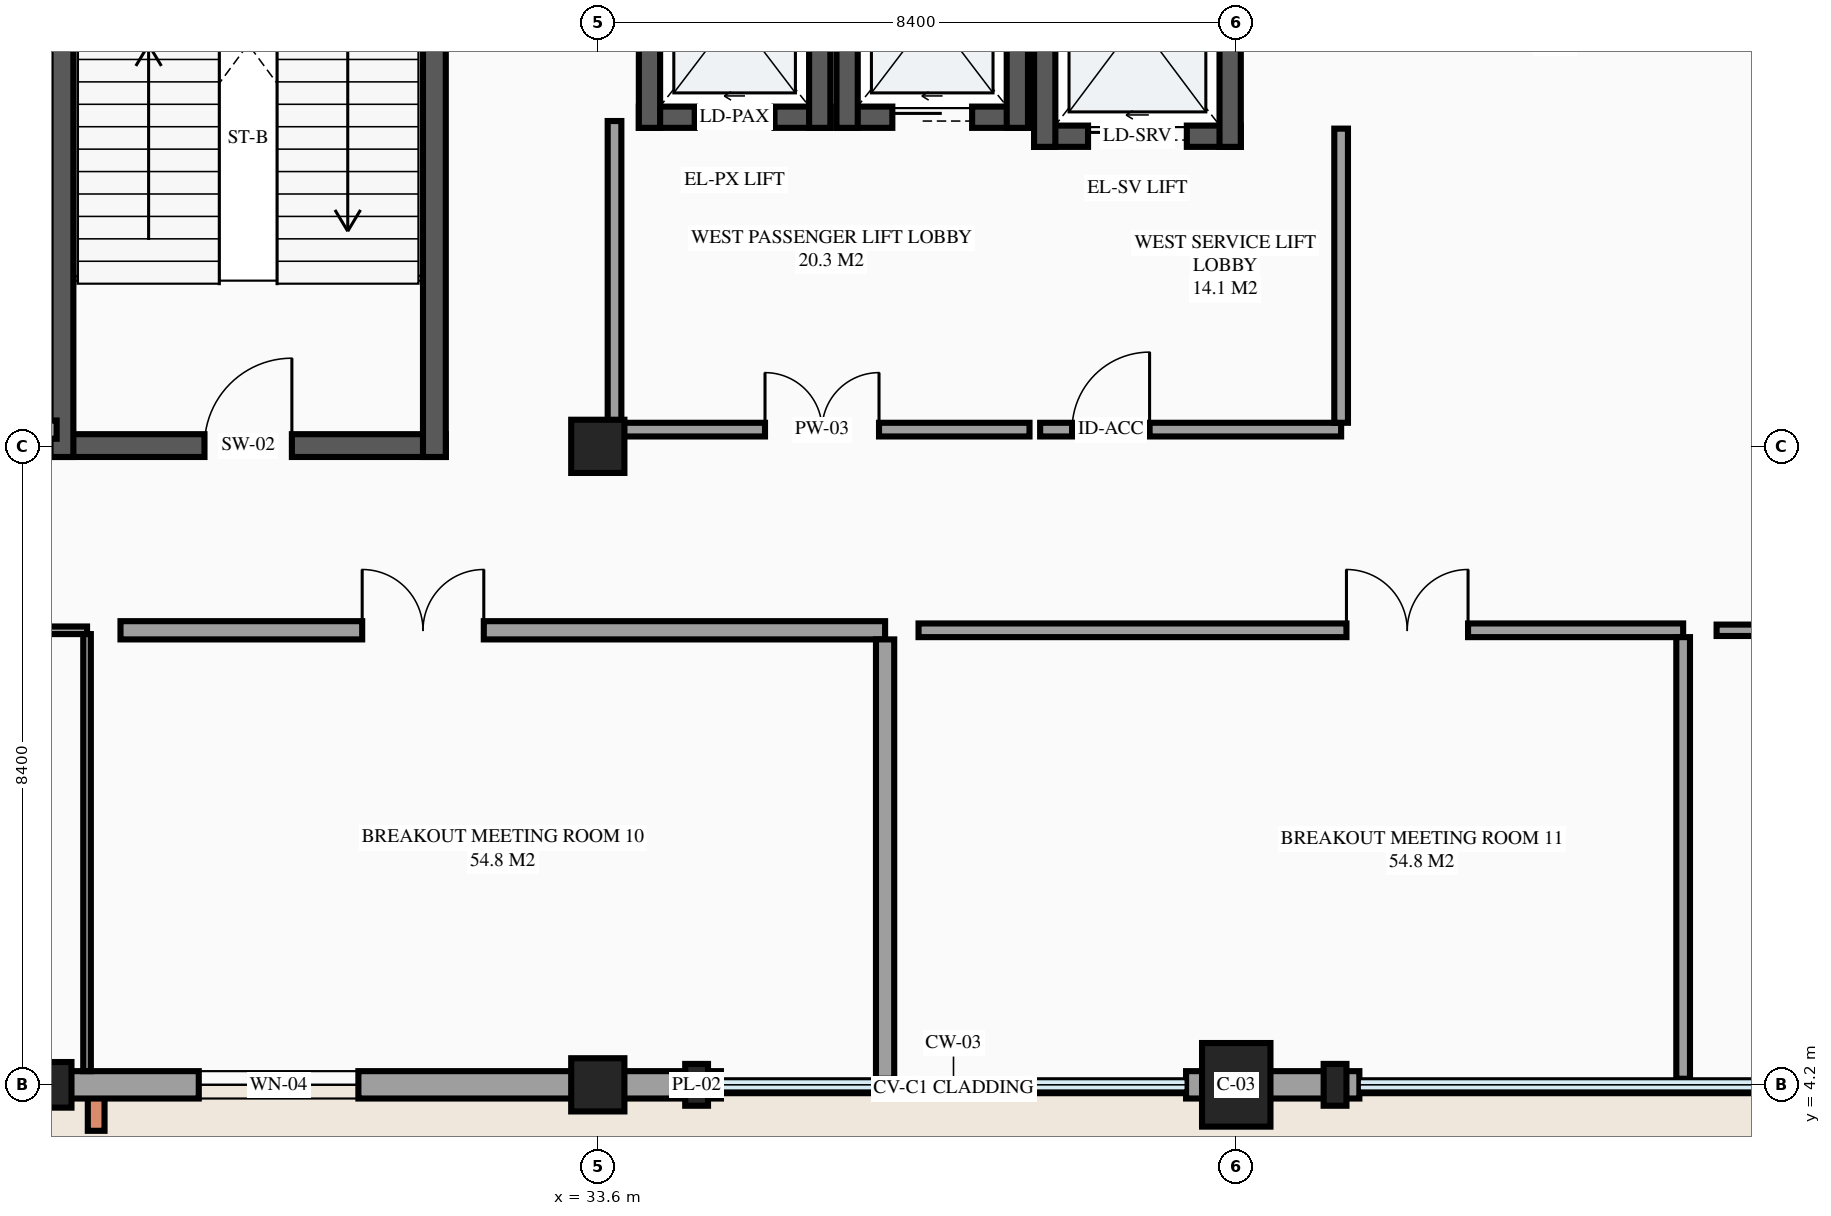
"""IFC4 building model, lengths in metres.
Left out: names, types, materials, properties, quantities, classifications, styles, units other than length and angle.
Written with IfcOpenShell. Run it as: python <this file> out.ifc"""

import sys

from ifc_helpers import new_model, si_unit, direction, frame, frame_2d, origin, origin_2d, place, context, subcontext, project, spatial, rectangle, extrude, element, fill, save


model = new_model("IFC4")
c1 = context("Model", 3, precision=1e-05, world=origin(), true_north=direction((0.0, 1.0)))
c2 = subcontext(c1, "Body", "Model", "MODEL_VIEW")
j1 = project(units=[si_unit("LENGTHUNIT", "METRE"), si_unit("PLANEANGLEUNIT", "RADIAN")], contexts=[c1])
p1 = place(None, origin())
s1 = spatial("IfcSite", under=j1, at=p1, CompositionType="ELEMENT")
p2 = place(p1, origin())
s2 = spatial("IfcBuilding", under=s1, at=p2, CompositionType="ELEMENT")
p3 = place(p2, frame((0.0, 0.0, 9.9)))
s3 = spatial("IfcBuildingStorey", under=s2, at=p3, CompositionType="ELEMENT", Elevation=9.9)
for number, where, z_axis, x_axis in (
    (1, (33.6, 4.2, 0.0), (0.0, 0.0, 1.0), (1.0, 0.0, 0.0)),
    (2, (33.6, 12.6, 0.0), (0.0, 0.0, 1.0), (1.0, 0.0, 0.0)),
):
    element("IfcColumn", number, at=place(p3, frame(where, z_axis=z_axis, x_axis=x_axis)), inside=s3, PredefinedType="COLUMN", context=c2, shape_type="SweptSolid", body=[
        extrude(rectangle(XDim=0.7, YDim=0.7, at=origin_2d()), origin(), (0.0, 0.0, 1.0), 4.2),
    ])
p4 = place(p3, frame((42.0, 4.2, 0.0), z_axis=(0.0, 0.0, 1.0), x_axis=(1.0, 0.0, 0.0)))
e3 = element("IfcColumn", 3, at=p4, inside=s3, PredefinedType="COLUMN", context=c2, shape_type="SweptSolid", body=[
    extrude(rectangle(XDim=0.9, YDim=1.1, at=origin_2d()), origin(), (0.0, 0.0, 1.0), 4.2),
])
p5 = place(p3, frame((26.5, 4.2, 0.0), z_axis=(0.0, 0.0, 1.0), x_axis=(1.0, 0.0, 0.0)))
e4 = element("IfcColumn", 4, at=p5, inside=s3, PredefinedType="PILASTER", context=c2, shape_type="SweptSolid", body=[
    extrude(rectangle(XDim=0.35, YDim=0.6, at=origin_2d()), origin(), (0.0, 0.0, 1.0), 4.2),
])
for number, where, z_axis, x_axis in (
    (5, (34.9, 4.2, 0.0), (0.0, 0.0, 1.0), (1.0, 0.0, 0.0)),
    (6, (43.3, 4.2, 0.0), (0.0, 0.0, 1.0), (1.0, 0.0, 0.0)),
):
    element("IfcColumn", number, at=place(p3, frame(where, z_axis=z_axis, x_axis=x_axis)), inside=s3, PredefinedType="PILASTER", context=c2, shape_type="SweptSolid", body=[
        extrude(rectangle(XDim=0.3, YDim=0.55, at=origin_2d()), origin(), (0.0, 0.0, 1.0), 4.2),
    ])
p6 = place(p3, frame((25.2, 4.2, 0.0), z_axis=(0.0, 0.0, 1.0), x_axis=(1.0, 0.0, 0.0)))
e7 = element("IfcWall", 7, at=p6, inside=s3, PredefinedType="STANDARD", context=c2, shape_type="SweptSolid", body=[
    extrude(rectangle(XDim=8.4, YDim=0.36, at=frame_2d((4.2, 0.0))), origin(), (0.0, 0.0, 1.0), 3.427),
])
p7 = place(p6, frame((3.15, 0.0, 0.75)))
e8 = element("IfcOpeningElement", 8, at=p7, cuts=e7, PredefinedType="OPENING", context=c2, shape_type="SweptSolid", body=[
    extrude(rectangle(XDim=2.1, YDim=1.5, at=frame_2d((1.05, 0.75))), frame((0.0, 0.19, 0.0), z_axis=(0.0, -1.0, 0.0), x_axis=(1.0, 0.0, 0.0)), (0.0, 0.0, 1.0), 0.38),
])
p8 = place(p3, frame((33.6, 4.2, 0.0), z_axis=(0.0, 0.0, 1.0), x_axis=(1.0, 0.0, 0.0)))
e9 = element("IfcWall", 9, at=p8, inside=s3, PredefinedType="STANDARD", context=c2, shape_type="SweptSolid", body=[
    extrude(rectangle(XDim=1.62, YDim=0.36, at=frame_2d((0.81, 0.0))), origin(), (0.0, 0.0, 1.0), 3.36),
])
p9 = place(p3, frame((41.34, 4.2, 0.0), z_axis=(0.0, 0.0, 1.0), x_axis=(1.0, 0.0, 0.0)))
e10 = element("IfcWall", 10, at=p9, inside=s3, PredefinedType="STANDARD", context=c2, shape_type="SweptSolid", body=[
    extrude(rectangle(XDim=0.66, YDim=0.36, at=frame_2d((0.33, 0.0))), origin(), (0.0, 0.0, 1.0), 4.2),
])
p10 = place(p3, frame((42.0, 4.2, 0.0), z_axis=(0.0, 0.0, 1.0), x_axis=(1.0, 0.0, 0.0)))
e11 = element("IfcWall", 11, at=p10, inside=s3, PredefinedType="STANDARD", context=c2, shape_type="SweptSolid", body=[
    extrude(rectangle(XDim=1.62, YDim=0.36, at=frame_2d((0.81, 0.0))), origin(), (0.0, 0.0, 1.0), 3.46),
])
p11 = place(p3, frame((34.14, 16.93, 0.0), z_axis=(0.0, 0.0, 1.0), x_axis=(1.0, 0.0, 0.0)))
e12 = element("IfcWall", 12, at=p11, inside=s3, PredefinedType="SHEAR", context=c2, shape_type="SweptSolid", body=[
    extrude(rectangle(XDim=2.52, YDim=0.28, at=frame_2d((1.26, 0.0))), origin(), (0.0, 0.0, 1.0), 4.2),
])
p12 = place(p11, frame((0.735, 0.0, 0.0)))
e13 = element("IfcOpeningElement", 13, at=p12, cuts=e12, PredefinedType="OPENING", context=c2, shape_type="SweptSolid", body=[
    extrude(rectangle(XDim=1.05, YDim=2.2, at=frame_2d((0.525, 1.1))), frame((0.0, 0.15, 0.0), z_axis=(0.0, -1.0, 0.0), x_axis=(1.0, 0.0, 0.0)), (0.0, 0.0, 1.0), 0.3),
])
for number, where, z_axis, x_axis in (
    (14, (36.52, 16.79, 0.0), (0.0, 0.0, 1.0), (0.0, 1.0, 0.0)),
    (15, (34.28, 19.81, 0.0), (0.0, 0.0, 1.0), (0.0, -1.0, 0.0)),
):
    element("IfcWall", number, at=place(p3, frame(where, z_axis=z_axis, x_axis=x_axis)), inside=s3, PredefinedType="SHEAR", context=c2, shape_type="SweptSolid", body=[
        extrude(rectangle(XDim=3.02, YDim=0.28, at=frame_2d((1.51, 0.0))), origin(), (0.0, 0.0, 1.0), 4.2),
    ])
p13 = place(p3, frame((36.74, 16.93, 0.0), z_axis=(0.0, 0.0, 1.0), x_axis=(1.0, 0.0, 0.0)))
e16 = element("IfcWall", 16, at=p13, inside=s3, PredefinedType="SHEAR", context=c2, shape_type="SweptSolid", body=[
    extrude(rectangle(XDim=2.52, YDim=0.28, at=frame_2d((1.26, 0.0))), origin(), (0.0, 0.0, 1.0), 4.2),
])
p14 = place(p13, frame((0.735, 0.0, 0.0)))
e17 = element("IfcOpeningElement", 17, at=p14, cuts=e16, PredefinedType="OPENING", context=c2, shape_type="SweptSolid", body=[
    extrude(rectangle(XDim=1.05, YDim=2.2, at=frame_2d((0.525, 1.1))), frame((0.0, 0.15, 0.0), z_axis=(0.0, -1.0, 0.0), x_axis=(1.0, 0.0, 0.0)), (0.0, 0.0, 1.0), 0.3),
])
for number, where, z_axis, x_axis in (
    (18, (39.12, 16.79, 0.0), (0.0, 0.0, 1.0), (0.0, 1.0, 0.0)),
    (19, (36.88, 19.81, 0.0), (0.0, 0.0, 1.0), (0.0, -1.0, 0.0)),
):
    element("IfcWall", number, at=place(p3, frame(where, z_axis=z_axis, x_axis=x_axis)), inside=s3, PredefinedType="SHEAR", context=c2, shape_type="SweptSolid", body=[
        extrude(rectangle(XDim=3.02, YDim=0.28, at=frame_2d((1.51, 0.0))), origin(), (0.0, 0.0, 1.0), 4.2),
    ])
p15 = place(p3, frame((39.34, 16.68, 0.0), z_axis=(0.0, 0.0, 1.0), x_axis=(1.0, 0.0, 0.0)))
e20 = element("IfcWall", 20, at=p15, inside=s3, PredefinedType="SHEAR", context=c2, shape_type="SweptSolid", body=[
    extrude(rectangle(XDim=2.72, YDim=0.28, at=frame_2d((1.36, 0.0))), origin(), (0.0, 0.0, 1.0), 4.2),
])
p16 = place(p15, frame((0.71, 0.0, 0.0)))
e21 = element("IfcOpeningElement", 21, at=p16, cuts=e20, PredefinedType="OPENING", context=c2, shape_type="SweptSolid", body=[
    extrude(rectangle(XDim=1.3, YDim=2.25, at=frame_2d((0.65, 1.125))), frame((0.0, 0.15, 0.0), z_axis=(0.0, -1.0, 0.0), x_axis=(1.0, 0.0, 0.0)), (0.0, 0.0, 1.0), 0.3),
])
for number, where, z_axis, x_axis in (
    (22, (41.92, 16.54, 0.0), (0.0, 0.0, 1.0), (0.0, 1.0, 0.0)),
    (23, (39.48, 19.86, 0.0), (0.0, 0.0, 1.0), (0.0, -1.0, 0.0)),
):
    element("IfcWall", number, at=place(p3, frame(where, z_axis=z_axis, x_axis=x_axis)), inside=s3, PredefinedType="SHEAR", context=c2, shape_type="SweptSolid", body=[
        extrude(rectangle(XDim=3.32, YDim=0.28, at=frame_2d((1.66, 0.0))), origin(), (0.0, 0.0, 1.0), 4.2),
    ])
p17 = place(p3, frame((26.4, 12.61, 0.0), z_axis=(0.0, 0.0, 1.0), x_axis=(1.0, 0.0, 0.0)))
e24 = element("IfcWall", 24, at=p17, inside=s3, PredefinedType="SHEAR", context=c2, shape_type="SweptSolid", body=[
    extrude(rectangle(XDim=5.2, YDim=0.3, at=frame_2d((2.6, 0.0))), origin(), (0.0, 0.0, 1.0), 4.2),
])
p18 = place(p17, frame((2.025, 0.0, 0.0)))
e25 = element("IfcOpeningElement", 25, at=p18, cuts=e24, PredefinedType="OPENING", context=c2, shape_type="SweptSolid", body=[
    extrude(rectangle(XDim=1.15, YDim=2.15, at=frame_2d((0.575, 1.075))), frame((0.0, 0.16, 0.0), z_axis=(0.0, -1.0, 0.0), x_axis=(1.0, 0.0, 0.0)), (0.0, 0.0, 1.0), 0.32),
])
for number, where, z_axis, x_axis in (
    (26, (31.45, 12.46, 0.0), (0.0, 0.0, 1.0), (0.0, 1.0, 0.0)),
    (27, (26.55, 21.3, 0.0), (0.0, 0.0, 1.0), (0.0, -1.0, 0.0)),
):
    element("IfcWall", number, at=place(p3, frame(where, z_axis=z_axis, x_axis=x_axis)), inside=s3, PredefinedType="SHEAR", context=c2, shape_type="SweptSolid", body=[
        extrude(rectangle(XDim=8.84, YDim=0.3, at=frame_2d((4.42, 0.0))), origin(), (0.0, 0.0, 1.0), 4.2),
    ])
p19 = place(p3, frame((33.82, 12.82, 0.0), z_axis=(0.0, 0.0, 1.0), x_axis=(1.0, 0.0, 0.0)))
e28 = element("IfcWall", 28, at=p19, inside=s3, PredefinedType="PARTITIONING", context=c2, shape_type="SweptSolid", body=[
    extrude(rectangle(XDim=5.46, YDim=0.18, at=frame_2d((2.73, 0.0))), origin(), (0.0, 0.0, 1.0), 3.955),
])
p20 = place(p19, frame((1.98, 0.0, 0.0)))
e29 = element("IfcOpeningElement", 29, at=p20, cuts=e28, PredefinedType="OPENING", context=c2, shape_type="SweptSolid", body=[
    extrude(rectangle(XDim=1.5, YDim=2.15, at=frame_2d((0.75, 1.075))), frame((0.0, 0.1, 0.0), z_axis=(0.0, -1.0, 0.0), x_axis=(1.0, 0.0, 0.0)), (0.0, 0.0, 1.0), 0.2),
])
p21 = place(p3, frame((33.82, 12.91, 0.0), z_axis=(0.0, 0.0, 1.0), x_axis=(0.0, 1.0, 0.0)))
e30 = element("IfcWall", 30, at=p21, inside=s3, PredefinedType="PARTITIONING", context=c2, shape_type="SweptSolid", body=[
    extrude(rectangle(XDim=3.97, YDim=0.18, at=frame_2d((1.985, 0.0))), origin(), (0.0, 0.0, 1.0), 3.11),
])
p22 = place(p3, frame((39.42, 12.82, 0.0), z_axis=(0.0, 0.0, 1.0), x_axis=(1.0, 0.0, 0.0)))
e31 = element("IfcWall", 31, at=p22, inside=s3, PredefinedType="PARTITIONING", context=c2, shape_type="SweptSolid", body=[
    extrude(rectangle(XDim=3.96, YDim=0.18, at=frame_2d((1.98, 0.0))), origin(), (0.0, 0.0, 1.0), 3.955),
])
p23 = place(p22, frame((0.42, 0.0, 0.0)))
e32 = element("IfcOpeningElement", 32, at=p23, cuts=e31, PredefinedType="OPENING", context=c2, shape_type="SweptSolid", body=[
    extrude(rectangle(XDim=1.02, YDim=2.15, at=frame_2d((0.51, 1.075))), frame((0.0, 0.1, 0.0), z_axis=(0.0, -1.0, 0.0), x_axis=(1.0, 0.0, 0.0)), (0.0, 0.0, 1.0), 0.2),
])
p24 = place(p3, frame((43.38, 12.91, 0.0), z_axis=(0.0, 0.0, 1.0), x_axis=(0.0, 1.0, 0.0)))
e33 = element("IfcWall", 33, at=p24, inside=s3, PredefinedType="PARTITIONING", context=c2, shape_type="SweptSolid", body=[
    extrude(rectangle(XDim=3.87, YDim=0.18, at=frame_2d((1.935, 0.0))), origin(), (0.0, 0.0, 1.0), 3.955),
])
p25 = place(p3, frame((16.82, 10.18, 0.0), z_axis=(0.0, 0.0, 1.0), x_axis=(1.0, 0.0, 0.0)))
e34 = element("IfcWall", 34, at=p25, inside=s3, PredefinedType="PARTITIONING", context=c2, shape_type="SweptSolid", body=[
    extrude(rectangle(XDim=10.06, YDim=0.1, at=frame_2d((5.03, 0.0))), origin(), (0.0, 0.0, 1.0), 3.955),
])
p26 = place(p25, frame((4.23, 0.0, 0.0)))
e35 = element("IfcOpeningElement", 35, at=p26, cuts=e34, PredefinedType="OPENING", context=c2, shape_type="SweptSolid", body=[
    extrude(rectangle(XDim=1.6, YDim=2.25, at=frame_2d((0.8, 1.125))), frame((0.0, 0.06, 0.0), z_axis=(0.0, -1.0, 0.0), x_axis=(1.0, 0.0, 0.0)), (0.0, 0.0, 1.0), 0.12),
])
p27 = place(p3, frame((26.88, 4.38, 0.0), z_axis=(0.0, 0.0, 1.0), x_axis=(0.0, 1.0, 0.0)))
e36 = element("IfcWall", 36, at=p27, inside=s3, PredefinedType="PARTITIONING", context=c2, shape_type="SweptSolid", body=[
    extrude(rectangle(XDim=5.75, YDim=0.1, at=frame_2d((2.875, 0.0))), origin(), (0.0, 0.0, 1.0), 3.955),
])
p28 = place(p3, frame((27.32, 10.18, 0.0), z_axis=(0.0, 0.0, 1.0), x_axis=(1.0, 0.0, 0.0)))
e37 = element("IfcWall", 37, at=p28, inside=s3, PredefinedType="PARTITIONING", context=c2, shape_type="SweptSolid", body=[
    extrude(rectangle(XDim=10.06, YDim=0.24, at=frame_2d((5.03, 0.0))), origin(), (0.0, 0.0, 1.0), 3.955),
])
p29 = place(p28, frame((3.18, 0.0, 0.0)))
e38 = element("IfcOpeningElement", 38, at=p29, cuts=e37, PredefinedType="OPENING", context=c2, shape_type="SweptSolid", body=[
    extrude(rectangle(XDim=1.6, YDim=2.25, at=frame_2d((0.8, 1.125))), frame((0.0, 0.13, 0.0), z_axis=(0.0, -1.0, 0.0), x_axis=(1.0, 0.0, 0.0)), (0.0, 0.0, 1.0), 0.26),
])
p30 = place(p3, frame((37.38, 4.28, 0.0), z_axis=(0.0, 0.0, 1.0), x_axis=(0.0, 1.0, 0.0)))
e39 = element("IfcWall", 39, at=p30, inside=s3, PredefinedType="PARTITIONING", context=c2, shape_type="SweptSolid", body=[
    extrude(rectangle(XDim=5.78, YDim=0.24, at=frame_2d((2.89, 0.0))), origin(), (0.0, 0.0, 1.0), 3.955),
])
p31 = place(p3, frame((37.82, 10.18, 0.0), z_axis=(0.0, 0.0, 1.0), x_axis=(1.0, 0.0, 0.0)))
e40 = element("IfcWall", 40, at=p31, inside=s3, PredefinedType="PARTITIONING", context=c2, shape_type="SweptSolid", body=[
    extrude(rectangle(XDim=10.06, YDim=0.18, at=frame_2d((5.03, 0.0))), origin(), (0.0, 0.0, 1.0), 3.955),
])
p32 = place(p31, frame((5.63, 0.0, 0.0)))
e41 = element("IfcOpeningElement", 41, at=p32, cuts=e40, PredefinedType="OPENING", context=c2, shape_type="SweptSolid", body=[
    extrude(rectangle(XDim=1.6, YDim=2.25, at=frame_2d((0.8, 1.125))), frame((0.0, 0.1, 0.0), z_axis=(0.0, -1.0, 0.0), x_axis=(1.0, 0.0, 0.0)), (0.0, 0.0, 1.0), 0.2),
])
p33 = place(p3, frame((47.88, 4.28, 0.0), z_axis=(0.0, 0.0, 1.0), x_axis=(0.0, 1.0, 0.0)))
e42 = element("IfcWall", 42, at=p33, inside=s3, PredefinedType="PARTITIONING", context=c2, shape_type="SweptSolid", body=[
    extrude(rectangle(XDim=5.81, YDim=0.18, at=frame_2d((2.905, 0.0))), origin(), (0.0, 0.0, 1.0), 3.955),
])
p34 = place(p3, frame((48.32, 10.18, 0.0), z_axis=(0.0, 0.0, 1.0), x_axis=(1.0, 0.0, 0.0)))
e43 = element("IfcWall", 43, at=p34, inside=s3, PredefinedType="PARTITIONING", context=c2, shape_type="SweptSolid", body=[
    extrude(rectangle(XDim=10.06, YDim=0.15, at=frame_2d((5.03, 0.0))), origin(), (0.0, 0.0, 1.0), 3.955),
])
p35 = place(p34, frame((4.23, 0.0, 0.0)))
e44 = element("IfcOpeningElement", 44, at=p35, cuts=e43, PredefinedType="OPENING", context=c2, shape_type="SweptSolid", body=[
    extrude(rectangle(XDim=1.6, YDim=2.25, at=frame_2d((0.8, 1.125))), frame((0.0, 0.085, 0.0), z_axis=(0.0, -1.0, 0.0), x_axis=(1.0, 0.0, 0.0)), (0.0, 0.0, 1.0), 0.17),
])
p36 = place(p3, frame((25.55, 12.82, 0.0), z_axis=(0.0, 0.0, 1.0), x_axis=(1.0, 0.0, 0.0)))
e45 = element("IfcWall", 45, at=p36, inside=s3, PredefinedType="PARTITIONING", context=c2, shape_type="SweptSolid", body=[
    extrude(rectangle(XDim=0.93, YDim=0.24, at=frame_2d((0.465, 0.0))), origin(), (0.0, 0.0, 1.0), 3.31),
])
p37 = place(p7, origin())
e46 = element("IfcWindow", 46, at=p37, inside=s3, PartitioningType="SINGLE_PANEL", PredefinedType="WINDOW", context=c2, shape_type="SweptSolid", body=[
    extrude(rectangle(XDim=2.1, YDim=1.5, at=frame_2d((1.05, 0.75))), frame((0.0, 0.03, 0.0), z_axis=(0.0, -1.0, 0.0), x_axis=(1.0, 0.0, 0.0)), (0.0, 0.0, 1.0), 0.06),
])
fill(e8, e46)
p38 = place(p12, origin())
e47 = element("IfcDoor", 47, at=p38, inside=s3, OperationType="SLIDING_TO_LEFT", PredefinedType="DOOR", context=c2, shape_type="SweptSolid", body=[
    extrude(rectangle(XDim=1.05, YDim=2.2, at=frame_2d((0.525, 1.1))), frame((0.0, 0.025, 0.0), z_axis=(0.0, -1.0, 0.0), x_axis=(1.0, 0.0, 0.0)), (0.0, 0.0, 1.0), 0.05),
])
fill(e13, e47)
p39 = place(p14, origin())
e48 = element("IfcDoor", 48, at=p39, inside=s3, OperationType="SLIDING_TO_LEFT", PredefinedType="DOOR", context=c2, shape_type="SweptSolid", body=[
    extrude(rectangle(XDim=1.05, YDim=2.2, at=frame_2d((0.525, 1.1))), frame((0.0, 0.025, 0.0), z_axis=(0.0, -1.0, 0.0), x_axis=(1.0, 0.0, 0.0)), (0.0, 0.0, 1.0), 0.05),
])
fill(e17, e48)
p40 = place(p16, origin())
e49 = element("IfcDoor", 49, at=p40, inside=s3, OperationType="SLIDING_TO_LEFT", PredefinedType="DOOR", context=c2, shape_type="SweptSolid", body=[
    extrude(rectangle(XDim=1.3, YDim=2.25, at=frame_2d((0.65, 1.125))), frame((0.0, 0.025, 0.0), z_axis=(0.0, -1.0, 0.0), x_axis=(1.0, 0.0, 0.0)), (0.0, 0.0, 1.0), 0.05),
])
fill(e21, e49)
p41 = place(p18, origin())
e50 = element("IfcDoor", 50, at=p41, inside=s3, OperationType="SINGLE_SWING_RIGHT", PredefinedType="DOOR", context=c2, shape_type="SweptSolid", body=[
    extrude(rectangle(XDim=1.15, YDim=2.15, at=frame_2d((0.575, 1.075))), frame((0.0, 0.025, 0.0), z_axis=(0.0, -1.0, 0.0), x_axis=(1.0, 0.0, 0.0)), (0.0, 0.0, 1.0), 0.05),
])
fill(e25, e50)
p42 = place(p20, origin())
e51 = element("IfcDoor", 51, at=p42, inside=s3, OperationType="DOUBLE_DOOR_SINGLE_SWING", PredefinedType="DOOR", context=c2, shape_type="SweptSolid", body=[
    extrude(rectangle(XDim=1.5, YDim=2.15, at=frame_2d((0.75, 1.075))), frame((0.0, 0.025, 0.0), z_axis=(0.0, -1.0, 0.0), x_axis=(1.0, 0.0, 0.0)), (0.0, 0.0, 1.0), 0.05),
])
fill(e29, e51)
p43 = place(p23, origin())
e52 = element("IfcDoor", 52, at=p43, inside=s3, OperationType="SINGLE_SWING_RIGHT", PredefinedType="DOOR", context=c2, shape_type="SweptSolid", body=[
    extrude(rectangle(XDim=1.02, YDim=2.15, at=frame_2d((0.51, 1.075))), frame((0.0, 0.025, 0.0), z_axis=(0.0, -1.0, 0.0), x_axis=(1.0, 0.0, 0.0)), (0.0, 0.0, 1.0), 0.05),
])
fill(e32, e52)
p44 = place(p29, origin())
e53 = element("IfcDoor", 53, at=p44, inside=s3, OperationType="DOUBLE_DOOR_SINGLE_SWING", PredefinedType="DOOR", context=c2, shape_type="SweptSolid", body=[
    extrude(rectangle(XDim=1.6, YDim=2.25, at=frame_2d((0.8, 1.125))), frame((0.0, 0.025, 0.0), z_axis=(0.0, -1.0, 0.0), x_axis=(1.0, 0.0, 0.0)), (0.0, 0.0, 1.0), 0.05),
])
fill(e38, e53)
p45 = place(p32, origin())
e54 = element("IfcDoor", 54, at=p45, inside=s3, OperationType="DOUBLE_DOOR_SINGLE_SWING", PredefinedType="DOOR", context=c2, shape_type="SweptSolid", body=[
    extrude(rectangle(XDim=1.6, YDim=2.25, at=frame_2d((0.8, 1.125))), frame((0.0, 0.025, 0.0), z_axis=(0.0, -1.0, 0.0), x_axis=(1.0, 0.0, 0.0)), (0.0, 0.0, 1.0), 0.05),
])
fill(e41, e54)
save(model, sys.argv[1])
